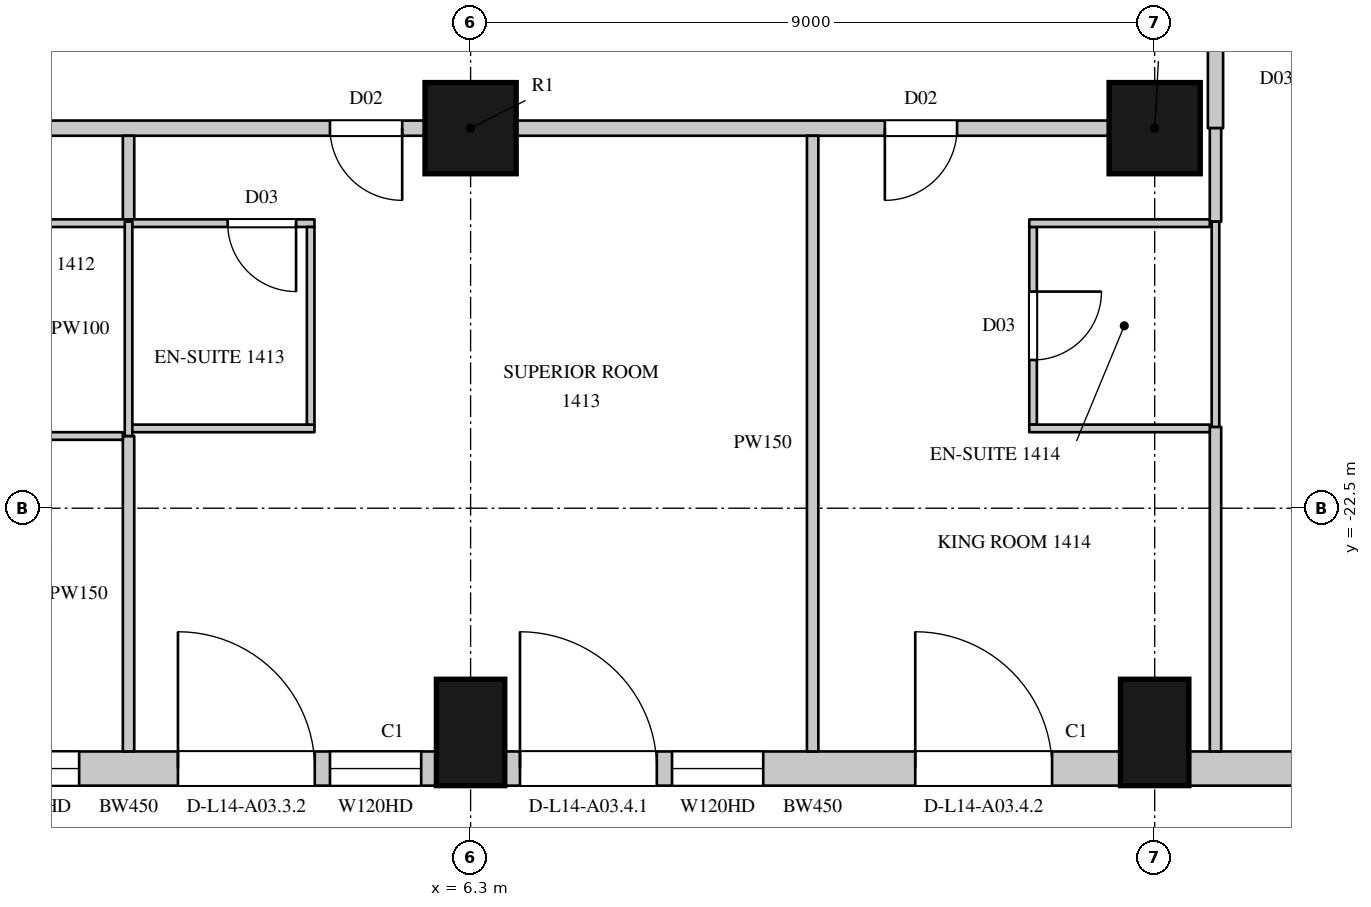
"""IFC4 building model, lengths in metres.
Left out: names, types, materials, properties, quantities, classifications, styles, units other than length and angle.
Written with IfcOpenShell. Run it as: python <this file> out.ifc"""

import sys

from ifc_helpers import new_model, si_unit, direction, frame, frame_2d, origin, origin_2d, place, context, subcontext, project, spatial, rectangle, circle, extrude, element, fill, save


model = new_model("IFC4")
c1 = context("Model", 3, precision=1e-05, world=origin(), true_north=direction((0.0, 1.0)))
c2 = subcontext(c1, "Body", "Model", "MODEL_VIEW")
j1 = project(units=[si_unit("LENGTHUNIT", "METRE"), si_unit("PLANEANGLEUNIT", "RADIAN")], contexts=[c1])
p1 = place(None, origin())
s1 = spatial("IfcSite", under=j1, at=p1, CompositionType="ELEMENT")
p2 = place(p1, origin())
s2 = spatial("IfcBuilding", under=s1, at=p2, CompositionType="ELEMENT")
p3 = place(p2, frame((0.0, 0.0, 80.7)))
s3 = spatial("IfcBuildingStorey", under=s2, at=p3, CompositionType="ELEMENT", Elevation=80.7)
for number, where, z_axis, x_axis in (
    (1, (6.3, -25.45, 0.0), (0.0, 0.0, 1.0), (1.0, 0.0, 0.0)),
    (2, (15.3, -25.45, 0.0), (0.0, 0.0, 1.0), (1.0, 0.0, 0.0)),
):
    element("IfcColumn", number, at=place(p3, frame(where, z_axis=z_axis, x_axis=x_axis)), inside=s3, PredefinedType="COLUMN", context=c2, shape_type="SweptSolid", body=[
        extrude(rectangle(XDim=0.9, YDim=1.4, at=origin_2d()), origin(), (0.0, 0.0, 1.0), 3.6),
    ])
for number, where, z_axis, x_axis in (
    (3, (6.3, -17.5, 0.0), (0.0, 0.0, 1.0), (1.0, 0.0, 0.0)),
    (4, (15.3, -17.5, 0.0), (0.0, 0.0, 1.0), (1.0, 0.0, 0.0)),
):
    element("IfcColumn", number, at=place(p3, frame(where, z_axis=z_axis, x_axis=x_axis)), inside=s3, PredefinedType="COLUMN", context=c2, shape_type="SweptSolid", body=[
        extrude(circle(Radius=0.6, at=origin_2d()), origin(), (0.0, 0.0, 1.0), 3.6),
    ])
p4 = place(p3, frame((-2.25, -25.925, 0.0), z_axis=(0.0, 0.0, 1.0), x_axis=(1.0, 0.0, 0.0)))
e5 = element("IfcWall", 5, at=p4, inside=s3, PredefinedType="SOLIDWALL", context=c2, shape_type="SweptSolid", body=[
    extrude(rectangle(XDim=8.1, YDim=0.45, at=frame_2d((4.05, 0.0))), origin(), (0.0, 0.0, 1.0), 3.3),
])
p5 = place(p4, frame((0.2, 0.0, 0.0)))
e6 = element("IfcOpeningElement", 6, at=p5, cuts=e5, PredefinedType="OPENING", context=c2, shape_type="SweptSolid", body=[
    extrude(rectangle(XDim=1.8, YDim=2.4, at=frame_2d((0.9, 1.2))), frame((0.0, 0.235, 0.0), z_axis=(0.0, -1.0, 0.0), x_axis=(1.0, 0.0, 0.0)), (0.0, 0.0, 1.0), 0.47),
])
p6 = place(p4, frame((2.2, 0.0, 1.05)))
e7 = element("IfcOpeningElement", 7, at=p6, cuts=e5, PredefinedType="OPENING", context=c2, shape_type="SweptSolid", body=[
    extrude(rectangle(XDim=1.2, YDim=2.0, at=frame_2d((0.6, 1.0))), frame((0.0, 0.235, 0.0), z_axis=(0.0, -1.0, 0.0), x_axis=(1.0, 0.0, 0.0)), (0.0, 0.0, 1.0), 0.47),
])
p7 = place(p4, frame((4.7, 0.0, 0.0)))
e8 = element("IfcOpeningElement", 8, at=p7, cuts=e5, PredefinedType="OPENING", context=c2, shape_type="SweptSolid", body=[
    extrude(rectangle(XDim=1.8, YDim=2.4, at=frame_2d((0.9, 1.2))), frame((0.0, 0.235, 0.0), z_axis=(0.0, -1.0, 0.0), x_axis=(1.0, 0.0, 0.0)), (0.0, 0.0, 1.0), 0.47),
])
p8 = place(p4, frame((6.7, 0.0, 1.05)))
e9 = element("IfcOpeningElement", 9, at=p8, cuts=e5, PredefinedType="OPENING", context=c2, shape_type="SweptSolid", body=[
    extrude(rectangle(XDim=1.2, YDim=2.0, at=frame_2d((0.6, 1.0))), frame((0.0, 0.235, 0.0), z_axis=(0.0, -1.0, 0.0), x_axis=(1.0, 0.0, 0.0)), (0.0, 0.0, 1.0), 0.47),
])
p9 = place(p3, frame((6.75, -25.925, 0.0), z_axis=(0.0, 0.0, 1.0), x_axis=(1.0, 0.0, 0.0)))
e10 = element("IfcWall", 10, at=p9, inside=s3, PredefinedType="SOLIDWALL", context=c2, shape_type="SweptSolid", body=[
    extrude(rectangle(XDim=8.1, YDim=0.45, at=frame_2d((4.05, 0.0))), origin(), (0.0, 0.0, 1.0), 3.3),
])
p10 = place(p9, frame((0.2, 0.0, 0.0)))
e11 = element("IfcOpeningElement", 11, at=p10, cuts=e10, PredefinedType="OPENING", context=c2, shape_type="SweptSolid", body=[
    extrude(rectangle(XDim=1.8, YDim=2.4, at=frame_2d((0.9, 1.2))), frame((0.0, 0.235, 0.0), z_axis=(0.0, -1.0, 0.0), x_axis=(1.0, 0.0, 0.0)), (0.0, 0.0, 1.0), 0.47),
])
p11 = place(p9, frame((2.2, 0.0, 1.05)))
e12 = element("IfcOpeningElement", 12, at=p11, cuts=e10, PredefinedType="OPENING", context=c2, shape_type="SweptSolid", body=[
    extrude(rectangle(XDim=1.2, YDim=2.0, at=frame_2d((0.6, 1.0))), frame((0.0, 0.235, 0.0), z_axis=(0.0, -1.0, 0.0), x_axis=(1.0, 0.0, 0.0)), (0.0, 0.0, 1.0), 0.47),
])
p12 = place(p9, frame((5.4, 0.0, 0.0)))
e13 = element("IfcOpeningElement", 13, at=p12, cuts=e10, PredefinedType="OPENING", context=c2, shape_type="SweptSolid", body=[
    extrude(rectangle(XDim=1.8, YDim=2.4, at=frame_2d((0.9, 1.2))), frame((0.0, 0.235, 0.0), z_axis=(0.0, -1.0, 0.0), x_axis=(1.0, 0.0, 0.0)), (0.0, 0.0, 1.0), 0.47),
])
p13 = place(p3, frame((15.75, -25.925, 0.0), z_axis=(0.0, 0.0, 1.0), x_axis=(1.0, 0.0, 0.0)))
e14 = element("IfcWall", 14, at=p13, inside=s3, PredefinedType="SOLIDWALL", context=c2, shape_type="SweptSolid", body=[
    extrude(rectangle(XDim=2.914, YDim=0.45, at=frame_2d((1.457, 0.0))), origin(), (0.0, 0.0, 1.0), 3.3),
])
p14 = place(p3, frame((-2.1, -17.5, 0.0), z_axis=(0.0, 0.0, 1.0), x_axis=(1.0, 0.0, 0.0)))
e15 = element("IfcWall", 15, at=p14, inside=s3, PredefinedType="PARTITIONING", context=c2, shape_type="SweptSolid", body=[
    extrude(rectangle(XDim=7.8, YDim=0.2, at=frame_2d((3.9, 0.0))), origin(), (0.0, 0.0, 1.0), 2.75),
])
p15 = place(p14, frame((6.55, 0.0, 0.0)))
e16 = element("IfcOpeningElement", 16, at=p15, cuts=e15, PredefinedType="OPENING", context=c2, shape_type="SweptSolid", body=[
    extrude(rectangle(XDim=0.95, YDim=2.2, at=frame_2d((0.475, 1.1))), frame((0.0, 0.11, 0.0), z_axis=(0.0, -1.0, 0.0), x_axis=(1.0, 0.0, 0.0)), (0.0, 0.0, 1.0), 0.22),
])
p16 = place(p3, frame((6.9, -17.5, 0.0), z_axis=(0.0, 0.0, 1.0), x_axis=(1.0, 0.0, 0.0)))
e17 = element("IfcWall", 17, at=p16, inside=s3, PredefinedType="PARTITIONING", context=c2, shape_type="SweptSolid", body=[
    extrude(rectangle(XDim=7.8, YDim=0.2, at=frame_2d((3.9, 0.0))), origin(), (0.0, 0.0, 1.0), 2.75),
])
p17 = place(p16, frame((4.85, 0.0, 0.0)))
e18 = element("IfcOpeningElement", 18, at=p17, cuts=e17, PredefinedType="OPENING", context=c2, shape_type="SweptSolid", body=[
    extrude(rectangle(XDim=0.95, YDim=2.2, at=frame_2d((0.475, 1.1))), frame((0.0, 0.11, 0.0), z_axis=(0.0, -1.0, 0.0), x_axis=(1.0, 0.0, 0.0)), (0.0, 0.0, 1.0), 0.22),
])
p18 = place(p3, frame((16.1, -17.5, 0.0), z_axis=(0.0, 0.0, 1.0), x_axis=(0.0, 1.0, 0.0)))
e19 = element("IfcWall", 19, at=p18, inside=s3, PredefinedType="PARTITIONING", context=c2, shape_type="SweptSolid", body=[
    extrude(rectangle(XDim=12.75, YDim=0.2, at=frame_2d((6.375, 0.0))), origin(), (0.0, 0.0, 1.0), 3.3),
])
p19 = place(p18, frame((2.75, 0.0, 0.0)))
e20 = element("IfcOpeningElement", 20, at=p19, cuts=e19, PredefinedType="OPENING", context=c2, shape_type="SweptSolid", body=[
    extrude(rectangle(XDim=0.95, YDim=2.2, at=frame_2d((0.475, 1.1))), frame((0.0, 0.11, 0.0), z_axis=(0.0, -1.0, 0.0), x_axis=(1.0, 0.0, 0.0)), (0.0, 0.0, 1.0), 0.22),
])
p20 = place(p18, frame((6.95, 0.0, 0.0)))
e21 = element("IfcOpeningElement", 21, at=p20, cuts=e19, PredefinedType="OPENING", context=c2, shape_type="SweptSolid", body=[
    extrude(rectangle(XDim=0.95, YDim=2.2, at=frame_2d((0.475, 1.1))), frame((0.0, 0.11, 0.0), z_axis=(0.0, -1.0, 0.0), x_axis=(1.0, 0.0, 0.0)), (0.0, 0.0, 1.0), 0.22),
])
p21 = place(p18, frame((11.4, 0.0, 0.0)))
e22 = element("IfcOpeningElement", 22, at=p21, cuts=e19, PredefinedType="OPENING", context=c2, shape_type="SweptSolid", body=[
    extrude(rectangle(XDim=0.95, YDim=2.2, at=frame_2d((0.475, 1.1))), frame((0.0, 0.11, 0.0), z_axis=(0.0, -1.0, 0.0), x_axis=(1.0, 0.0, 0.0)), (0.0, 0.0, 1.0), 0.22),
])
p22 = place(p3, frame((1.8, -25.7, 0.0), z_axis=(0.0, 0.0, 1.0), x_axis=(0.0, 1.0, 0.0)))
e23 = element("IfcWall", 23, at=p22, inside=s3, PredefinedType="PARTITIONING", context=c2, shape_type="SweptSolid", body=[
    extrude(rectangle(XDim=4.15, YDim=0.15, at=frame_2d((2.075, 0.0))), origin(), (0.0, 0.0, 1.0), 2.65),
])
p23 = place(p3, frame((1.8, -18.73, 0.0), z_axis=(0.0, 0.0, 1.0), x_axis=(0.0, 1.0, 0.0)))
e24 = element("IfcWall", 24, at=p23, inside=s3, PredefinedType="PARTITIONING", context=c2, shape_type="SweptSolid", body=[
    extrude(rectangle(XDim=1.13, YDim=0.15, at=frame_2d((0.565, 0.0))), origin(), (0.0, 0.0, 1.0), 2.65),
])
p24 = place(p3, frame((10.8, -25.7, 0.0), z_axis=(0.0, 0.0, 1.0), x_axis=(0.0, 1.0, 0.0)))
e25 = element("IfcWall", 25, at=p24, inside=s3, PredefinedType="PARTITIONING", context=c2, shape_type="SweptSolid", body=[
    extrude(rectangle(XDim=8.1, YDim=0.15, at=frame_2d((4.05, 0.0))), origin(), (0.0, 0.0, 1.0), 2.65),
])
p25 = place(p3, frame((16.1, -25.7, 0.0), z_axis=(0.0, 0.0, 1.0), x_axis=(0.0, 1.0, 0.0)))
e26 = element("IfcWall", 26, at=p25, inside=s3, PredefinedType="PARTITIONING", context=c2, shape_type="SweptSolid", body=[
    extrude(rectangle(XDim=4.27, YDim=0.15, at=frame_2d((2.135, 0.0))), origin(), (0.0, 0.0, 1.0), 3.3),
])
p26 = place(p3, frame((16.1, -18.73, 0.0), z_axis=(0.0, 0.0, 1.0), x_axis=(0.0, 1.0, 0.0)))
e27 = element("IfcWall", 27, at=p26, inside=s3, PredefinedType="PARTITIONING", context=c2, shape_type="SweptSolid", body=[
    extrude(rectangle(XDim=1.23, YDim=0.15, at=frame_2d((0.615, 0.0))), origin(), (0.0, 0.0, 1.0), 3.3),
])
p27 = place(p3, frame((-0.846, -21.55, 0.0), z_axis=(0.0, 0.0, 1.0), x_axis=(1.0, 0.0, 0.0)))
e28 = element("IfcWall", 28, at=p27, inside=s3, PredefinedType="PARTITIONING", context=c2, shape_type="SweptSolid", body=[
    extrude(rectangle(XDim=2.571, YDim=0.1, at=frame_2d((1.286, 0.0))), origin(), (0.0, 0.0, 1.0), 3.3),
])
p28 = place(p3, frame((-0.846, -18.75, 0.0), z_axis=(0.0, 0.0, 1.0), x_axis=(1.0, 0.0, 0.0)))
e29 = element("IfcWall", 29, at=p28, inside=s3, PredefinedType="PARTITIONING", context=c2, shape_type="SweptSolid", body=[
    extrude(rectangle(XDim=5.092, YDim=0.1, at=frame_2d((2.546, 0.0))), origin(), (0.0, 0.0, 1.0), 3.3),
])
p29 = place(p28, frame((3.95, 0.0, 0.0)))
e30 = element("IfcOpeningElement", 30, at=p29, cuts=e29, PredefinedType="OPENING", context=c2, shape_type="SweptSolid", body=[
    extrude(rectangle(XDim=0.9, YDim=2.2, at=frame_2d((0.45, 1.1))), frame((0.0, 0.06, 0.0), z_axis=(0.0, -1.0, 0.0), x_axis=(1.0, 0.0, 0.0)), (0.0, 0.0, 1.0), 0.12),
])
p30 = place(p3, frame((1.8, -21.55, 0.0), z_axis=(0.0, 0.0, 1.0), x_axis=(0.0, 1.0, 0.0)))
e31 = element("IfcWall", 31, at=p30, inside=s3, PredefinedType="PARTITIONING", context=c2, shape_type="SweptSolid", body=[
    extrude(rectangle(XDim=2.82, YDim=0.1, at=frame_2d((1.41, 0.0))), origin(), (0.0, 0.0, 1.0), 2.65),
])
p31 = place(p3, frame((1.85, -21.45, 0.0), z_axis=(0.0, 0.0, 1.0), x_axis=(1.0, 0.0, 0.0)))
e32 = element("IfcWall", 32, at=p31, inside=s3, PredefinedType="PARTITIONING", context=c2, shape_type="SweptSolid", body=[
    extrude(rectangle(XDim=2.396, YDim=0.1, at=frame_2d((1.198, 0.0))), origin(), (0.0, 0.0, 1.0), 3.3),
])
p32 = place(p3, frame((4.196, -21.4, 0.0), z_axis=(0.0, 0.0, 1.0), x_axis=(0.0, 1.0, 0.0)))
e33 = element("IfcWall", 33, at=p32, inside=s3, PredefinedType="PARTITIONING", context=c2, shape_type="SweptSolid", body=[
    extrude(rectangle(XDim=2.6, YDim=0.1, at=frame_2d((1.3, 0.0))), origin(), (0.0, 0.0, 1.0), 3.3),
])
p33 = place(p3, frame((13.7, -21.4, 0.0), z_axis=(0.0, 0.0, 1.0), x_axis=(0.0, 1.0, 0.0)))
e34 = element("IfcWall", 34, at=p33, inside=s3, PredefinedType="PARTITIONING", context=c2, shape_type="SweptSolid", body=[
    extrude(rectangle(XDim=2.6, YDim=0.1, at=frame_2d((1.3, 0.0))), origin(), (0.0, 0.0, 1.0), 3.3),
])
p34 = place(p33, frame((0.85, 0.0, 0.0)))
e35 = element("IfcOpeningElement", 35, at=p34, cuts=e34, PredefinedType="OPENING", context=c2, shape_type="SweptSolid", body=[
    extrude(rectangle(XDim=0.9, YDim=2.2, at=frame_2d((0.45, 1.1))), frame((0.0, 0.06, 0.0), z_axis=(0.0, -1.0, 0.0), x_axis=(1.0, 0.0, 0.0)), (0.0, 0.0, 1.0), 0.12),
])
for number, where, z_axis, x_axis in (
    (36, (13.65, -21.45, 0.0), (0.0, 0.0, 1.0), (1.0, 0.0, 0.0)),
    (37, (13.65, -18.75, 0.0), (0.0, 0.0, 1.0), (1.0, 0.0, 0.0)),
):
    element("IfcWall", number, at=place(p3, frame(where, z_axis=z_axis, x_axis=x_axis)), inside=s3, PredefinedType="PARTITIONING", context=c2, shape_type="SweptSolid", body=[
        extrude(rectangle(XDim=2.375, YDim=0.1, at=frame_2d((1.188, 0.0))), origin(), (0.0, 0.0, 1.0), 3.3),
    ])
p35 = place(p3, frame((16.1, -21.43, 0.0), z_axis=(0.0, 0.0, 1.0), x_axis=(0.0, 1.0, 0.0)))
e38 = element("IfcWall", 38, at=p35, inside=s3, PredefinedType="PARTITIONING", context=c2, shape_type="SweptSolid", body=[
    extrude(rectangle(XDim=2.7, YDim=0.1, at=frame_2d((1.35, 0.0))), origin(), (0.0, 0.0, 1.0), 3.3),
])
p36 = place(p6, origin())
e39 = element("IfcWindow", 39, at=p36, inside=s3, PartitioningType="SINGLE_PANEL", PredefinedType="WINDOW", context=c2, shape_type="SweptSolid", body=[
    extrude(rectangle(XDim=1.2, YDim=2.0, at=frame_2d((0.6, 1.0))), frame((0.0, 0.135, 0.0), z_axis=(0.0, -1.0, 0.0), x_axis=(1.0, 0.0, 0.0)), (0.0, 0.0, 1.0), 0.06),
])
fill(e7, e39)
p37 = place(p7, origin())
e40 = element("IfcDoor", 40, at=p37, inside=s3, OperationType="SLIDING_TO_LEFT", PredefinedType="DOOR", context=c2, shape_type="SweptSolid", body=[
    extrude(rectangle(XDim=1.8, YDim=2.4, at=frame_2d((0.9, 1.2))), frame((0.0, 0.13, 0.0), z_axis=(0.0, -1.0, 0.0), x_axis=(1.0, 0.0, 0.0)), (0.0, 0.0, 1.0), 0.05),
])
fill(e8, e40)
p38 = place(p8, origin())
e41 = element("IfcWindow", 41, at=p38, inside=s3, PartitioningType="SINGLE_PANEL", PredefinedType="WINDOW", context=c2, shape_type="SweptSolid", body=[
    extrude(rectangle(XDim=1.2, YDim=2.0, at=frame_2d((0.6, 1.0))), frame((0.0, 0.135, 0.0), z_axis=(0.0, -1.0, 0.0), x_axis=(1.0, 0.0, 0.0)), (0.0, 0.0, 1.0), 0.06),
])
fill(e9, e41)
p39 = place(p10, origin())
e42 = element("IfcDoor", 42, at=p39, inside=s3, OperationType="SLIDING_TO_LEFT", PredefinedType="DOOR", context=c2, shape_type="SweptSolid", body=[
    extrude(rectangle(XDim=1.8, YDim=2.4, at=frame_2d((0.9, 1.2))), frame((0.0, 0.13, 0.0), z_axis=(0.0, -1.0, 0.0), x_axis=(1.0, 0.0, 0.0)), (0.0, 0.0, 1.0), 0.05),
])
fill(e11, e42)
p40 = place(p11, origin())
e43 = element("IfcWindow", 43, at=p40, inside=s3, PartitioningType="SINGLE_PANEL", PredefinedType="WINDOW", context=c2, shape_type="SweptSolid", body=[
    extrude(rectangle(XDim=1.2, YDim=2.0, at=frame_2d((0.6, 1.0))), frame((0.0, 0.135, 0.0), z_axis=(0.0, -1.0, 0.0), x_axis=(1.0, 0.0, 0.0)), (0.0, 0.0, 1.0), 0.06),
])
fill(e12, e43)
p41 = place(p12, origin())
e44 = element("IfcDoor", 44, at=p41, inside=s3, OperationType="SLIDING_TO_LEFT", PredefinedType="DOOR", context=c2, shape_type="SweptSolid", body=[
    extrude(rectangle(XDim=1.8, YDim=2.4, at=frame_2d((0.9, 1.2))), frame((0.0, 0.13, 0.0), z_axis=(0.0, -1.0, 0.0), x_axis=(1.0, 0.0, 0.0)), (0.0, 0.0, 1.0), 0.05),
])
fill(e13, e44)
p42 = place(p15, origin())
e45 = element("IfcDoor", 45, at=p42, inside=s3, OperationType="SINGLE_SWING_LEFT", PredefinedType="DOOR", context=c2, shape_type="SweptSolid", body=[
    extrude(rectangle(XDim=0.95, YDim=2.2, at=frame_2d((0.475, 1.1))), frame((0.0, 0.025, 0.0), z_axis=(0.0, -1.0, 0.0), x_axis=(1.0, 0.0, 0.0)), (0.0, 0.0, 1.0), 0.05),
])
fill(e16, e45)
p43 = place(p29, origin())
e46 = element("IfcDoor", 46, at=p43, inside=s3, OperationType="SINGLE_SWING_LEFT", PredefinedType="DOOR", context=c2, shape_type="SweptSolid", body=[
    extrude(rectangle(XDim=0.9, YDim=2.2, at=frame_2d((0.45, 1.1))), frame((0.0, 0.025, 0.0), z_axis=(0.0, -1.0, 0.0), x_axis=(1.0, 0.0, 0.0)), (0.0, 0.0, 1.0), 0.05),
])
fill(e30, e46)
p44 = place(p17, origin())
e47 = element("IfcDoor", 47, at=p44, inside=s3, OperationType="SINGLE_SWING_RIGHT", PredefinedType="DOOR", context=c2, shape_type="SweptSolid", body=[
    extrude(rectangle(XDim=0.95, YDim=2.2, at=frame_2d((0.475, 1.1))), frame((0.0, 0.025, 0.0), z_axis=(0.0, -1.0, 0.0), x_axis=(1.0, 0.0, 0.0)), (0.0, 0.0, 1.0), 0.05),
])
fill(e18, e47)
p45 = place(p34, origin())
e48 = element("IfcDoor", 48, at=p45, inside=s3, OperationType="SINGLE_SWING_LEFT", PredefinedType="DOOR", context=c2, shape_type="SweptSolid", body=[
    extrude(rectangle(XDim=0.9, YDim=2.2, at=frame_2d((0.45, 1.1))), frame((0.0, 0.025, 0.0), z_axis=(0.0, -1.0, 0.0), x_axis=(1.0, 0.0, 0.0)), (0.0, 0.0, 1.0), 0.05),
])
fill(e35, e48)
save(model, sys.argv[1])
